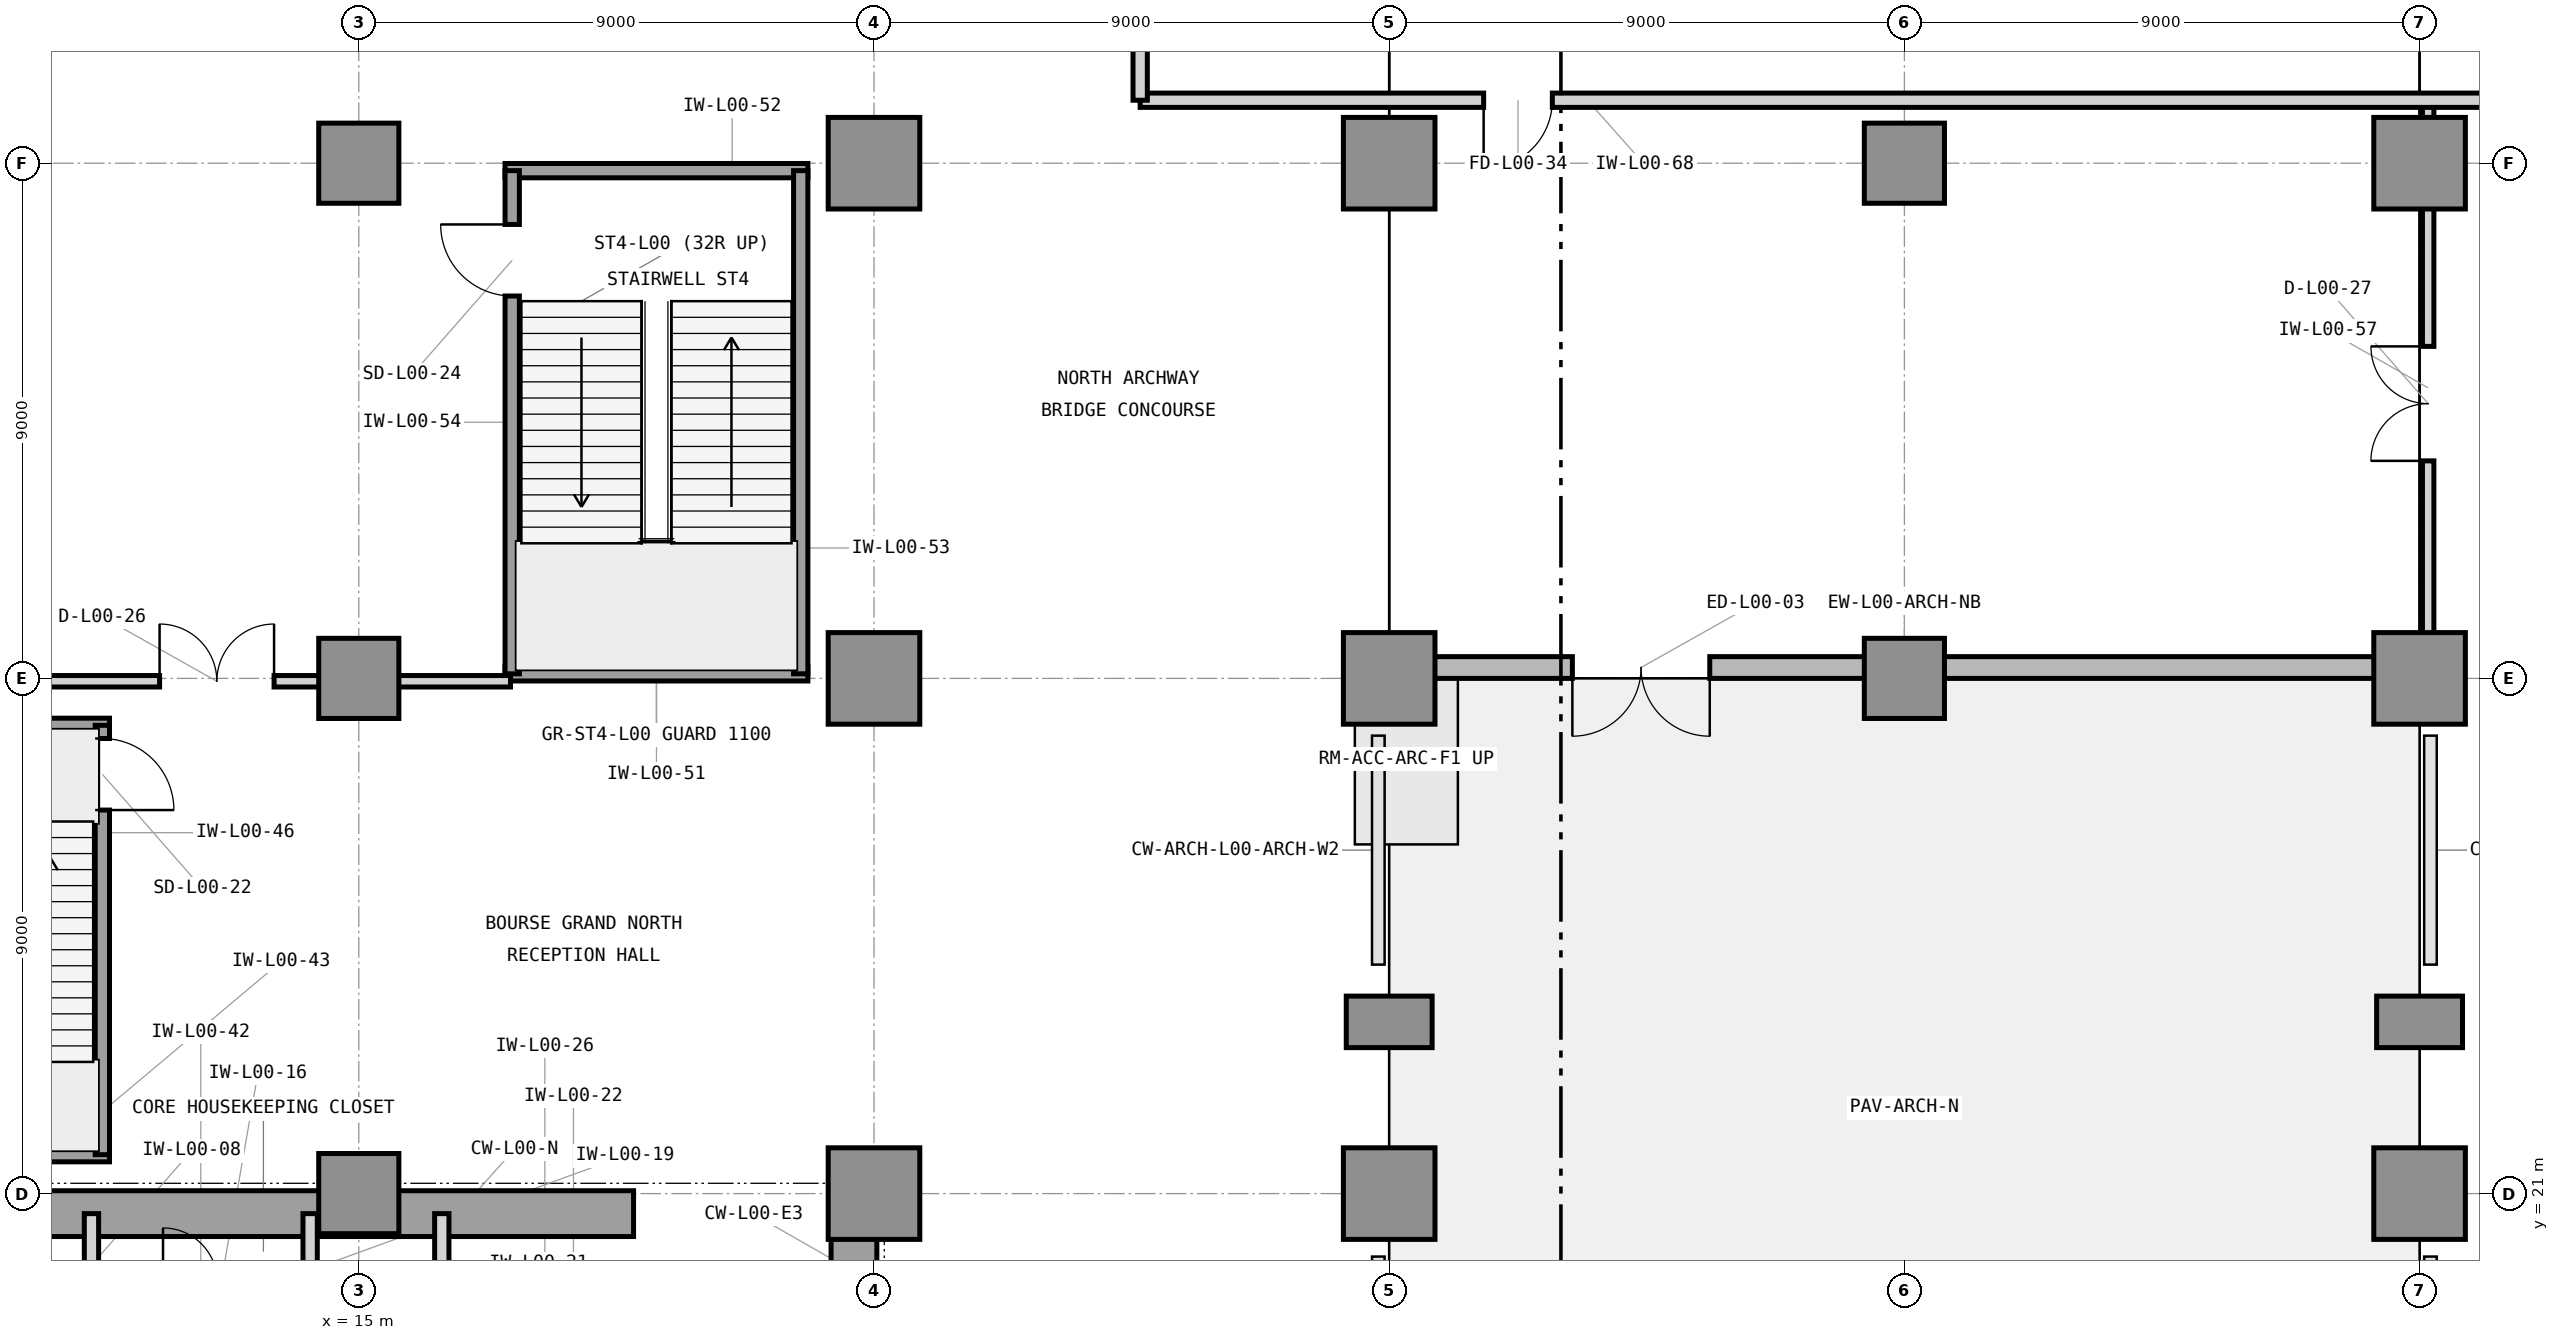
"""IFC4 building model, lengths in metres.
Left out: names, types, materials, properties, quantities, classifications, styles, units other than length and angle.
Written with IfcOpenShell. Run it as: python <this file> out.ifc"""

import sys

from ifc_helpers import new_model, si_unit, direction, frame, frame_2d, origin, origin_2d, place, context, subcontext, project, spatial, rectangle, extrude, element, fill, save


model = new_model("IFC4")
c1 = context("Model", 3, precision=1e-05, world=origin(), true_north=direction((0.0, 1.0)))
c2 = subcontext(c1, "Body", "Model", "MODEL_VIEW")
j1 = project(units=[si_unit("LENGTHUNIT", "METRE"), si_unit("PLANEANGLEUNIT", "RADIAN")], contexts=[c1])
p1 = place(None, origin())
s1 = spatial("IfcSite", under=j1, at=p1, CompositionType="ELEMENT")
p2 = place(p1, origin())
s2 = spatial("IfcBuilding", under=s1, at=p2, CompositionType="ELEMENT")
p3 = place(p2, origin())
s3 = spatial("IfcBuildingStorey", under=s2, at=p3, CompositionType="ELEMENT", Elevation=0.0)
p4 = place(p3, frame((7.475, 20.65, 0.0), z_axis=(0.0, 0.0, 1.0), x_axis=(1.0, 0.0, 0.0)))
e1 = element("IfcWall", 1, at=p4, inside=s3, PredefinedType="SHEAR", context=c2, shape_type="SweptSolid", body=[
    extrude(rectangle(XDim=12.325, YDim=0.8, at=frame_2d((6.163, 0.0))), origin(), (0.0, 0.0, 1.0), 5.4),
])
p5 = place(p3, frame((23.65, 16.6, 0.0), z_axis=(0.0, 0.0, 1.0), x_axis=(0.0, 1.0, 0.0)))
e2 = element("IfcWall", 2, at=p5, inside=s3, PredefinedType="SHEAR", context=c2, shape_type="SweptSolid", body=[
    extrude(rectangle(XDim=4.05, YDim=0.8, at=frame_2d((2.025, 0.0))), origin(), (0.0, 0.0, 1.0), 5.4),
])
for number, where, z_axis, x_axis in (
    (3, (15.0, 21.0, 0.0), (0.0, 0.0, 1.0), (1.0, 0.0, 0.0)),
    (4, (15.0, 30.0, 0.0), (0.0, 0.0, 1.0), (1.0, 0.0, 0.0)),
    (5, (15.0, 39.0, 0.0), (0.0, 0.0, 1.0), (1.0, 0.0, 0.0)),
):
    element("IfcColumn", number, at=place(p3, frame(where, z_axis=z_axis, x_axis=x_axis)), inside=s3, PredefinedType="COLUMN", context=c2, shape_type="SweptSolid", body=[
        extrude(rectangle(XDim=1.4, YDim=1.4, at=origin_2d()), origin(), (0.0, 0.0, 1.0), 5.4),
    ])
for number, where, z_axis, x_axis in (
    (6, (24.0, 21.0, 0.0), (0.0, 0.0, 1.0), (1.0, 0.0, 0.0)),
    (7, (24.0, 30.0, 0.0), (0.0, 0.0, 1.0), (1.0, 0.0, 0.0)),
    (8, (24.0, 39.0, 0.0), (0.0, 0.0, 1.0), (1.0, 0.0, 0.0)),
    (9, (33.0, 21.0, 0.0), (0.0, 0.0, 1.0), (1.0, 0.0, 0.0)),
    (10, (33.0, 30.0, 0.0), (0.0, 0.0, 1.0), (1.0, 0.0, 0.0)),
    (11, (33.0, 39.0, 0.0), (0.0, 0.0, 1.0), (1.0, 0.0, 0.0)),
):
    element("IfcColumn", number, at=place(p3, frame(where, z_axis=z_axis, x_axis=x_axis)), inside=s3, PredefinedType="COLUMN", context=c2, shape_type="SweptSolid", body=[
        extrude(rectangle(XDim=1.6, YDim=1.6, at=origin_2d()), origin(), (0.0, 0.0, 1.0), 5.4),
    ])
for number, where, z_axis, x_axis in (
    (12, (42.0, 30.0, 0.0), (0.0, 0.0, 1.0), (1.0, 0.0, 0.0)),
    (13, (42.0, 39.0, 0.0), (0.0, 0.0, 1.0), (1.0, 0.0, 0.0)),
):
    element("IfcColumn", number, at=place(p3, frame(where, z_axis=z_axis, x_axis=x_axis)), inside=s3, PredefinedType="COLUMN", context=c2, shape_type="SweptSolid", body=[
        extrude(rectangle(XDim=1.4, YDim=1.4, at=origin_2d()), origin(), (0.0, 0.0, 1.0), 5.4),
    ])
for number, where, z_axis, x_axis in (
    (14, (51.0, 21.0, 0.0), (0.0, 0.0, 1.0), (1.0, 0.0, 0.0)),
    (15, (51.0, 30.0, 0.0), (0.0, 0.0, 1.0), (1.0, 0.0, 0.0)),
    (16, (51.0, 39.0, 0.0), (0.0, 0.0, 1.0), (1.0, 0.0, 0.0)),
):
    element("IfcColumn", number, at=place(p3, frame(where, z_axis=z_axis, x_axis=x_axis)), inside=s3, PredefinedType="COLUMN", context=c2, shape_type="SweptSolid", body=[
        extrude(rectangle(XDim=1.6, YDim=1.6, at=origin_2d()), origin(), (0.0, 0.0, 1.0), 5.4),
    ])
for number, where, z_axis, x_axis in (
    (17, (33.0, 24.0, 0.0), (0.0, 0.0, 1.0), (1.0, 0.0, 0.0)),
    (18, (51.0, 24.0, 0.0), (0.0, 0.0, 1.0), (1.0, 0.0, 0.0)),
):
    element("IfcColumn", number, at=place(p3, frame(where, z_axis=z_axis, x_axis=x_axis)), inside=s3, PredefinedType="PILASTER", context=c2, shape_type="SweptSolid", body=[
        extrude(rectangle(XDim=0.9, YDim=1.5, at=origin_2d()), origin(), (0.0, 0.0, 1.0), 5.4),
    ])
p6 = place(p3, frame((33.0, 30.19, 0.0), z_axis=(0.0, 0.0, 1.0), x_axis=(1.0, 0.0, 0.0)))
e19 = element("IfcWall", 19, at=p6, inside=s3, PredefinedType="STANDARD", context=c2, shape_type="SweptSolid", body=[
    extrude(rectangle(XDim=18.0, YDim=0.38, at=frame_2d((9.0, 0.0))), origin(), (0.0, 0.0, 1.0), 4.234),
])
p7 = place(p6, frame((3.2, 0.0, 0.0)))
e20 = element("IfcOpeningElement", 20, at=p7, cuts=e19, PredefinedType="OPENING", context=c2, shape_type="SweptSolid", body=[
    extrude(rectangle(XDim=2.4, YDim=2.8, at=frame_2d((1.2, 1.4))), frame((0.0, 0.2, 0.0), z_axis=(0.0, -1.0, 0.0), x_axis=(1.0, 0.0, 0.0)), (0.0, 0.0, 1.0), 0.4),
])
p8 = place(p3, frame((10.33, 19.45, 0.0), z_axis=(0.0, 0.0, 1.0), x_axis=(0.0, 1.0, 0.0)))
e21 = element("IfcWall", 21, at=p8, inside=s3, PredefinedType="PARTITIONING", context=c2, shape_type="SweptSolid", body=[
    extrude(rectangle(XDim=1.2, YDim=0.25, at=frame_2d((0.6, 0.0))), origin(), (0.0, 0.0, 1.0), 4.234),
])
for number, where, z_axis, x_axis in (
    (22, (14.15, 16.7, 0.0), (0.0, 0.0, 1.0), (0.0, 1.0, 0.0)),
    (23, (16.45, 16.7, 0.0), (0.0, 0.0, 1.0), (0.0, 1.0, 0.0)),
):
    element("IfcWall", number, at=place(p3, frame(where, z_axis=z_axis, x_axis=x_axis)), inside=s3, PredefinedType="PARTITIONING", context=c2, shape_type="SweptSolid", body=[
        extrude(rectangle(XDim=3.95, YDim=0.25, at=frame_2d((1.975, 0.0))), origin(), (0.0, 0.0, 1.0), 5.09),
    ])
for number, where, z_axis, x_axis in (
    (24, (6.555, 21.68, 0.0), (0.0, 0.0, 1.0), (1.0, 0.0, 0.0)),
    (25, (6.555, 29.18, 0.0), (0.0, 0.0, 1.0), (1.0, 0.0, 0.0)),
):
    element("IfcWall", number, at=place(p3, frame(where, z_axis=z_axis, x_axis=x_axis)), inside=s3, PredefinedType="SHEAR", context=c2, shape_type="SweptSolid", body=[
        extrude(rectangle(XDim=4.09, YDim=0.25, at=frame_2d((2.045, 0.0))), origin(), (0.0, 0.0, 1.0), 5.4),
    ])
p9 = place(p3, frame((10.52, 21.68, 0.0), z_axis=(0.0, 0.0, 1.0), x_axis=(0.0, 1.0, 0.0)))
e26 = element("IfcWall", 26, at=p9, inside=s3, PredefinedType="SHEAR", context=c2, shape_type="SweptSolid", body=[
    extrude(rectangle(XDim=7.5, YDim=0.25, at=frame_2d((3.75, 0.0))), origin(), (0.0, 0.0, 1.0), 5.4),
])
p10 = place(p9, frame((6.02, 0.0, 0.0)))
e27 = element("IfcOpeningElement", 27, at=p10, cuts=e26, PredefinedType="OPENING", context=c2, shape_type="SweptSolid", body=[
    extrude(rectangle(XDim=1.25, YDim=2.2, at=frame_2d((0.625, 1.1))), frame((0.0, 0.135, 0.0), z_axis=(0.0, -1.0, 0.0), x_axis=(1.0, 0.0, 0.0)), (0.0, 0.0, 1.0), 0.27),
])
for number, where, z_axis, x_axis in (
    (28, (17.555, 30.08, 0.0), (0.0, 0.0, 1.0), (1.0, 0.0, 0.0)),
    (29, (17.555, 38.87, 0.0), (0.0, 0.0, 1.0), (1.0, 0.0, 0.0)),
):
    element("IfcWall", number, at=place(p3, frame(where, z_axis=z_axis, x_axis=x_axis)), inside=s3, PredefinedType="SHEAR", context=c2, shape_type="SweptSolid", body=[
        extrude(rectangle(XDim=5.29, YDim=0.25, at=frame_2d((2.645, 0.0))), origin(), (0.0, 0.0, 1.0), 5.4),
    ])
p11 = place(p3, frame((22.72, 30.08, 0.0), z_axis=(0.0, 0.0, 1.0), x_axis=(0.0, 1.0, 0.0)))
e30 = element("IfcWall", 30, at=p11, inside=s3, PredefinedType="SHEAR", context=c2, shape_type="SweptSolid", body=[
    extrude(rectangle(XDim=8.79, YDim=0.25, at=frame_2d((4.395, 0.0))), origin(), (0.0, 0.0, 1.0), 5.4),
])
p12 = place(p3, frame((17.68, 30.08, 0.0), z_axis=(0.0, 0.0, 1.0), x_axis=(0.0, 1.0, 0.0)))
e31 = element("IfcWall", 31, at=p12, inside=s3, PredefinedType="SHEAR", context=c2, shape_type="SweptSolid", body=[
    extrude(rectangle(XDim=8.79, YDim=0.25, at=frame_2d((4.395, 0.0))), origin(), (0.0, 0.0, 1.0), 5.4),
])
p13 = place(p12, frame((6.6, 0.0, 0.0)))
e32 = element("IfcOpeningElement", 32, at=p13, cuts=e31, PredefinedType="OPENING", context=c2, shape_type="SweptSolid", body=[
    extrude(rectangle(XDim=1.25, YDim=2.2, at=frame_2d((0.625, 1.1))), frame((0.0, 0.135, 0.0), z_axis=(0.0, -1.0, 0.0), x_axis=(1.0, 0.0, 0.0)), (0.0, 0.0, 1.0), 0.27),
])
p14 = place(p3, frame((0.42, 29.95, 0.0), z_axis=(0.0, 0.0, 1.0), x_axis=(1.0, 0.0, 0.0)))
e33 = element("IfcWall", 33, at=p14, inside=s3, PredefinedType="PARTITIONING", context=c2, shape_type="SweptSolid", body=[
    extrude(rectangle(XDim=17.23, YDim=0.2, at=frame_2d((8.615, 0.0))), origin(), (0.0, 0.0, 1.0), 4.234),
])
p15 = place(p14, frame((11.1, 0.0, 0.0)))
e34 = element("IfcOpeningElement", 34, at=p15, cuts=e33, PredefinedType="OPENING", context=c2, shape_type="SweptSolid", body=[
    extrude(rectangle(XDim=2.0, YDim=2.5, at=frame_2d((1.0, 1.25))), frame((0.0, 0.11, 0.0), z_axis=(0.0, -1.0, 0.0), x_axis=(1.0, 0.0, 0.0)), (0.0, 0.0, 1.0), 0.22),
])
p16 = place(p3, frame((51.15, 30.0, 0.0), z_axis=(0.0, 0.0, 1.0), x_axis=(0.0, 1.0, 0.0)))
e35 = element("IfcWall", 35, at=p16, inside=s3, PredefinedType="PARTITIONING", context=c2, shape_type="SweptSolid", body=[
    extrude(rectangle(XDim=10.15, YDim=0.2, at=frame_2d((5.075, 0.0))), origin(), (0.0, 0.0, 1.0), 4.234),
])
p17 = place(p16, frame((3.8, 0.0, 0.0)))
e36 = element("IfcOpeningElement", 36, at=p17, cuts=e35, PredefinedType="OPENING", context=c2, shape_type="SweptSolid", body=[
    extrude(rectangle(XDim=2.0, YDim=2.5, at=frame_2d((1.0, 1.25))), frame((0.0, 0.11, 0.0), z_axis=(0.0, -1.0, 0.0), x_axis=(1.0, 0.0, 0.0)), (0.0, 0.0, 1.0), 0.22),
])
p18 = place(p3, frame((28.65, 40.1, 0.0), z_axis=(0.0, 0.0, 1.0), x_axis=(1.0, 0.0, 0.0)))
e37 = element("IfcWall", 37, at=p18, inside=s3, PredefinedType="PARTITIONING", context=c2, shape_type="SweptSolid", body=[
    extrude(rectangle(XDim=31.25, YDim=0.25, at=frame_2d((15.625, 0.0))), origin(), (0.0, 0.0, 1.0), 5.09),
])
p19 = place(p18, frame((6.0, 0.0, 0.0)))
e38 = element("IfcOpeningElement", 38, at=p19, cuts=e37, PredefinedType="OPENING", context=c2, shape_type="SweptSolid", body=[
    extrude(rectangle(XDim=1.2, YDim=2.2, at=frame_2d((0.6, 1.1))), frame((0.0, 0.135, 0.0), z_axis=(0.0, -1.0, 0.0), x_axis=(1.0, 0.0, 0.0)), (0.0, 0.0, 1.0), 0.27),
])
p20 = place(p3, frame((28.65, 40.1, 0.0), z_axis=(0.0, 0.0, 1.0), x_axis=(0.0, 1.0, 0.0)))
e39 = element("IfcWall", 39, at=p20, inside=s3, PredefinedType="PARTITIONING", context=c2, shape_type="SweptSolid", body=[
    extrude(rectangle(XDim=10.48, YDim=0.25, at=frame_2d((5.24, 0.0))), origin(), (0.0, 0.0, 1.0), 5.09),
])
p21 = place(p7, frame((2.4, 0.0, 0.0), z_axis=(0.0, 0.0, 1.0), x_axis=(-1.0, 0.0, 0.0)))
e40 = element("IfcDoor", 40, at=p21, inside=s3, OperationType="DOUBLE_DOOR_SINGLE_SWING", PredefinedType="DOOR", context=c2, shape_type="SweptSolid", body=[
    extrude(rectangle(XDim=2.4, YDim=2.8, at=frame_2d((1.2, 1.4))), frame((0.0, 0.025, 0.0), z_axis=(0.0, -1.0, 0.0), x_axis=(1.0, 0.0, 0.0)), (0.0, 0.0, 1.0), 0.05),
])
fill(e20, e40)
p22 = place(p10, frame((1.25, 0.0, 0.0), z_axis=(0.0, 0.0, 1.0), x_axis=(-1.0, 0.0, 0.0)))
e41 = element("IfcDoor", 41, at=p22, inside=s3, OperationType="SINGLE_SWING_RIGHT", PredefinedType="DOOR", context=c2, shape_type="SweptSolid", body=[
    extrude(rectangle(XDim=1.25, YDim=2.2, at=frame_2d((0.625, 1.1))), frame((0.0, 0.025, 0.0), z_axis=(0.0, -1.0, 0.0), x_axis=(1.0, 0.0, 0.0)), (0.0, 0.0, 1.0), 0.05),
])
fill(e27, e41)
p23 = place(p13, origin())
e42 = element("IfcDoor", 42, at=p23, inside=s3, OperationType="SINGLE_SWING_RIGHT", PredefinedType="DOOR", context=c2, shape_type="SweptSolid", body=[
    extrude(rectangle(XDim=1.25, YDim=2.2, at=frame_2d((0.625, 1.1))), frame((0.0, 0.025, 0.0), z_axis=(0.0, -1.0, 0.0), x_axis=(1.0, 0.0, 0.0)), (0.0, 0.0, 1.0), 0.05),
])
fill(e32, e42)
p24 = place(p15, origin())
e43 = element("IfcDoor", 43, at=p24, inside=s3, OperationType="DOUBLE_DOOR_SINGLE_SWING", PredefinedType="DOOR", context=c2, shape_type="SweptSolid", body=[
    extrude(rectangle(XDim=2.0, YDim=2.5, at=frame_2d((1.0, 1.25))), frame((0.0, 0.025, 0.0), z_axis=(0.0, -1.0, 0.0), x_axis=(1.0, 0.0, 0.0)), (0.0, 0.0, 1.0), 0.05),
])
fill(e34, e43)
p25 = place(p17, origin())
e44 = element("IfcDoor", 44, at=p25, inside=s3, OperationType="DOUBLE_DOOR_SINGLE_SWING", PredefinedType="DOOR", context=c2, shape_type="SweptSolid", body=[
    extrude(rectangle(XDim=2.0, YDim=2.5, at=frame_2d((1.0, 1.25))), frame((0.0, 0.025, 0.0), z_axis=(0.0, -1.0, 0.0), x_axis=(1.0, 0.0, 0.0)), (0.0, 0.0, 1.0), 0.05),
])
fill(e36, e44)
p26 = place(p19, frame((1.2, 0.0, 0.0), z_axis=(0.0, 0.0, 1.0), x_axis=(-1.0, 0.0, 0.0)))
e45 = element("IfcDoor", 45, at=p26, inside=s3, OperationType="SINGLE_SWING_RIGHT", PredefinedType="DOOR", context=c2, shape_type="SweptSolid", body=[
    extrude(rectangle(XDim=1.2, YDim=2.2, at=frame_2d((0.6, 1.1))), frame((0.0, 0.025, 0.0), z_axis=(0.0, -1.0, 0.0), x_axis=(1.0, 0.0, 0.0)), (0.0, 0.0, 1.0), 0.05),
])
fill(e38, e45)
save(model, sys.argv[1])
